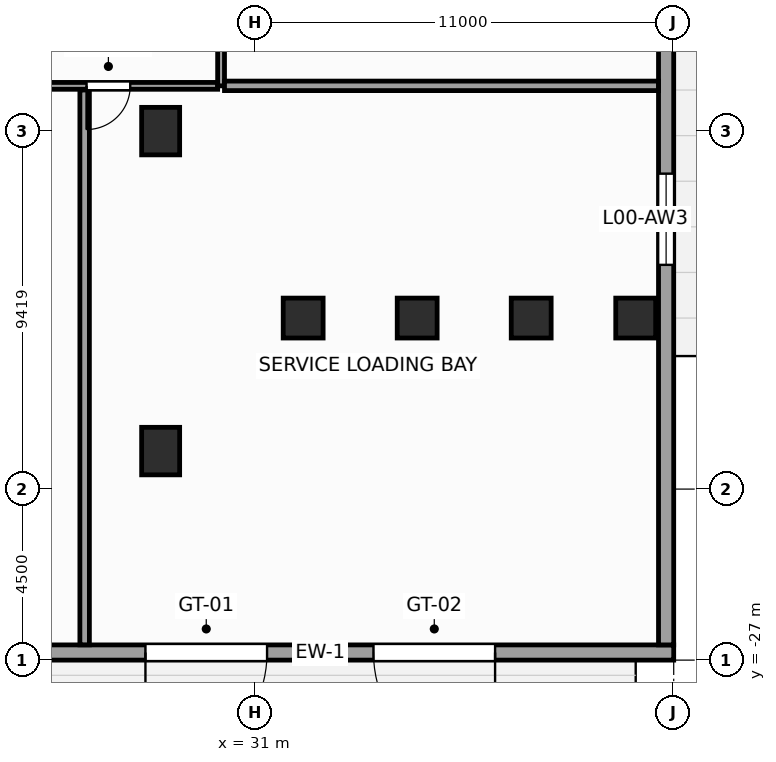
"""IFC4 building model, lengths in metres.
Left out: names, types, materials, properties, quantities, classifications, styles, units other than length and angle.
Written with IfcOpenShell. Run it as: python <this file> out.ifc"""

import sys

from ifc_helpers import new_model, si_unit, direction, frame, frame_2d, origin, origin_2d, place, context, subcontext, project, spatial, rectangle, extrude, source, transform, mapped, element, fill, save


model = new_model("IFC4")
c1 = context("Model", 3, precision=1e-05, world=origin(), true_north=direction((0.0, 1.0)))
c2 = subcontext(c1, "Body", "Model", "MODEL_VIEW")
j1 = project(units=[si_unit("LENGTHUNIT", "METRE"), si_unit("PLANEANGLEUNIT", "RADIAN")], contexts=[c1])
p1 = place(None, origin())
s1 = spatial("IfcSite", under=j1, at=p1, CompositionType="ELEMENT")
p2 = place(p1, origin())
s2 = spatial("IfcBuilding", under=s1, at=p2, CompositionType="ELEMENT")
p3 = place(p2, origin())
s3 = spatial("IfcBuildingStorey", under=s2, at=p3, CompositionType="ELEMENT", Elevation=0.0)
m1 = source(origin(), c2, "Body", "SweptSolid", [
    extrude(rectangle(XDim=1.0, YDim=1.25, at=origin_2d()), origin(), (0.0, 0.0, 1.0), 6.0),
])
for number, where, z_axis, x_axis in (
    (1, (28.5, -21.5, 0.0), (0.0, 0.0, 1.0), (1.0, 0.0, 0.0)),
    (2, (28.5, -13.081, 0.0), (0.0, 0.0, 1.0), (1.0, 0.0, 0.0)),
):
    element("IfcColumn", number, at=place(p3, frame(where, z_axis=z_axis, x_axis=x_axis)), inside=s3, PredefinedType="COLUMN", context=c2, shape_type="MappedRepresentation", body=[
        mapped(m1, transform((0.0, 0.0, 0.0), scale=1.0)),
    ])
m2 = source(origin(), c2, "Body", "SweptSolid", [
    extrude(rectangle(XDim=1.05, YDim=1.05, at=origin_2d()), origin(), (0.0, 0.0, 1.0), 6.0),
])
for number, where, z_axis, x_axis in (
    (3, (32.25, -18.0, 0.0), (0.0, 0.0, 1.0), (1.0, 0.0, 0.0)),
    (4, (35.25, -18.0, 0.0), (0.0, 0.0, 1.0), (1.0, 0.0, 0.0)),
    (5, (38.25, -18.0, 0.0), (0.0, 0.0, 1.0), (1.0, 0.0, 0.0)),
    (6, (41.0, -18.0, 0.0), (0.0, 0.0, 1.0), (1.0, 0.0, 0.0)),
):
    element("IfcColumn", number, at=place(p3, frame(where, z_axis=z_axis, x_axis=x_axis)), inside=s3, PredefinedType="COLUMN", context=c2, shape_type="MappedRepresentation", body=[
        mapped(m2, transform((0.0, 0.0, 0.0), scale=1.0)),
    ])
p4 = place(p3, frame((24.6, -26.8, 0.0), z_axis=(0.0, 0.0, 1.0), x_axis=(1.0, 0.0, 0.0)))
e7 = element("IfcWall", 7, at=p4, inside=s3, PredefinedType="STANDARD", context=c2, shape_type="SweptSolid", body=[
    extrude(rectangle(XDim=17.4, YDim=0.4, at=frame_2d((8.7, 0.0))), origin(), (0.0, 0.0, 1.0), 5.66),
])
p5 = place(p4, frame((3.5, 0.0, 0.0)))
e8 = element("IfcOpeningElement", 8, at=p5, cuts=e7, PredefinedType="OPENING", context=c2, shape_type="SweptSolid", body=[
    extrude(rectangle(XDim=3.2, YDim=3.6, at=frame_2d((1.6, 1.8))), frame((0.0, 0.21, 0.0), z_axis=(0.0, -1.0, 0.0), x_axis=(1.0, 0.0, 0.0)), (0.0, 0.0, 1.0), 0.42),
])
p6 = place(p4, frame((9.5, 0.0, 0.0)))
e9 = element("IfcOpeningElement", 9, at=p6, cuts=e7, PredefinedType="OPENING", context=c2, shape_type="SweptSolid", body=[
    extrude(rectangle(XDim=3.2, YDim=3.6, at=frame_2d((1.6, 1.8))), frame((0.0, 0.21, 0.0), z_axis=(0.0, -1.0, 0.0), x_axis=(1.0, 0.0, 0.0)), (0.0, 0.0, 1.0), 0.42),
])
p7 = place(p3, frame((41.8, -26.6, 0.0), z_axis=(0.0, 0.0, 1.0), x_axis=(0.0, 1.0, 0.0)))
e10 = element("IfcWall", 10, at=p7, inside=s3, PredefinedType="STANDARD", context=c2, shape_type="SweptSolid", body=[
    extrude(rectangle(XDim=53.2, YDim=0.4, at=frame_2d((26.6, 0.0))), origin(), (0.0, 0.0, 1.0), 5.66),
])
p8 = place(p7, frame((10.0, 0.0, 0.9)))
e11 = element("IfcOpeningElement", 11, at=p8, cuts=e10, PredefinedType="OPENING", context=c2, shape_type="SweptSolid", body=[
    extrude(rectangle(XDim=2.4, YDim=3.2, at=frame_2d((1.2, 1.6))), frame((0.0, 0.21, 0.0), z_axis=(0.0, -1.0, 0.0), x_axis=(1.0, 0.0, 0.0)), (0.0, 0.0, 1.0), 0.42),
])
p9 = place(p7, frame((36.0, 0.0, 0.9)))
e12 = element("IfcOpeningElement", 12, at=p9, cuts=e10, PredefinedType="OPENING", context=c2, shape_type="SweptSolid", body=[
    extrude(rectangle(XDim=2.4, YDim=3.2, at=frame_2d((1.2, 1.6))), frame((0.0, 0.21, 0.0), z_axis=(0.0, -1.0, 0.0), x_axis=(1.0, 0.0, 0.0)), (0.0, 0.0, 1.0), 0.42),
])
p10 = place(p7, frame((23.0, 0.0, 0.0)))
e13 = element("IfcOpeningElement", 13, at=p10, cuts=e10, PredefinedType="OPENING", context=c2, shape_type="SweptSolid", body=[
    extrude(rectangle(XDim=3.2, YDim=3.6, at=frame_2d((1.6, 1.8))), frame((0.0, 0.21, 0.0), z_axis=(0.0, -1.0, 0.0), x_axis=(1.0, 0.0, 0.0)), (0.0, 0.0, 1.0), 0.42),
])
p11 = place(p3, frame((-30.0, -11.89, 0.0), z_axis=(0.0, 0.0, 1.0), x_axis=(1.0, 0.0, 0.0)))
e14 = element("IfcWall", 14, at=p11, inside=s3, PredefinedType="PARTITIONING", context=c2, shape_type="SweptSolid", body=[
    extrude(rectangle(XDim=60.0, YDim=0.18, at=frame_2d((30.0, 0.0))), origin(), (0.0, 0.0, 1.0), 5.66),
])
p12 = place(p11, frame((2.25, 0.0, 0.0)))
e15 = element("IfcOpeningElement", 15, at=p12, cuts=e14, PredefinedType="OPENING", context=c2, shape_type="SweptSolid", body=[
    extrude(rectangle(XDim=1.15, YDim=2.25, at=frame_2d((0.575, 1.125))), frame((0.0, 0.1, 0.0), z_axis=(0.0, -1.0, 0.0), x_axis=(1.0, 0.0, 0.0)), (0.0, 0.0, 1.0), 0.2),
])
p13 = place(p11, frame((7.5, 0.0, 0.0)))
e16 = element("IfcOpeningElement", 16, at=p13, cuts=e14, PredefinedType="OPENING", context=c2, shape_type="SweptSolid", body=[
    extrude(rectangle(XDim=1.15, YDim=2.25, at=frame_2d((0.575, 1.125))), frame((0.0, 0.1, 0.0), z_axis=(0.0, -1.0, 0.0), x_axis=(1.0, 0.0, 0.0)), (0.0, 0.0, 1.0), 0.2),
])
p14 = place(p11, frame((12.6, 0.0, 0.0)))
e17 = element("IfcOpeningElement", 17, at=p14, cuts=e14, PredefinedType="OPENING", context=c2, shape_type="SweptSolid", body=[
    extrude(rectangle(XDim=0.95, YDim=2.1, at=frame_2d((0.475, 1.05))), frame((0.0, 0.1, 0.0), z_axis=(0.0, -1.0, 0.0), x_axis=(1.0, 0.0, 0.0)), (0.0, 0.0, 1.0), 0.2),
])
p15 = place(p11, frame((14.85, 0.0, 0.0)))
e18 = element("IfcOpeningElement", 18, at=p15, cuts=e14, PredefinedType="OPENING", context=c2, shape_type="SweptSolid", body=[
    extrude(rectangle(XDim=0.95, YDim=2.1, at=frame_2d((0.475, 1.05))), frame((0.0, 0.1, 0.0), z_axis=(0.0, -1.0, 0.0), x_axis=(1.0, 0.0, 0.0)), (0.0, 0.0, 1.0), 0.2),
])
p16 = place(p11, frame((28.5, 0.0, 0.0)))
e19 = element("IfcOpeningElement", 19, at=p16, cuts=e14, PredefinedType="OPENING", context=c2, shape_type="SweptSolid", body=[
    extrude(rectangle(XDim=1.6, YDim=2.5, at=frame_2d((0.8, 1.25))), frame((0.0, 0.1, 0.0), z_axis=(0.0, -1.0, 0.0), x_axis=(1.0, 0.0, 0.0)), (0.0, 0.0, 1.0), 0.2),
])
p17 = place(p11, frame((49.5, 0.0, 0.0)))
e20 = element("IfcOpeningElement", 20, at=p17, cuts=e14, PredefinedType="OPENING", context=c2, shape_type="SweptSolid", body=[
    extrude(rectangle(XDim=1.1, YDim=2.2, at=frame_2d((0.55, 1.1))), frame((0.0, 0.1, 0.0), z_axis=(0.0, -1.0, 0.0), x_axis=(1.0, 0.0, 0.0)), (0.0, 0.0, 1.0), 0.2),
])
p18 = place(p11, frame((56.55, 0.0, 0.0)))
e21 = element("IfcOpeningElement", 21, at=p18, cuts=e14, PredefinedType="OPENING", context=c2, shape_type="SweptSolid", body=[
    extrude(rectangle(XDim=1.15, YDim=2.25, at=frame_2d((0.575, 1.125))), frame((0.0, 0.1, 0.0), z_axis=(0.0, -1.0, 0.0), x_axis=(1.0, 0.0, 0.0)), (0.0, 0.0, 1.0), 0.2),
])
p19 = place(p3, frame((30.09, -11.89, 0.0), z_axis=(0.0, 0.0, 1.0), x_axis=(0.0, 1.0, 0.0)))
e22 = element("IfcWall", 22, at=p19, inside=s3, PredefinedType="PARTITIONING", context=c2, shape_type="SweptSolid", body=[
    extrude(rectangle(XDim=3.38, YDim=0.18, at=frame_2d((1.69, 0.0))), origin(), (0.0, 0.0, 1.0), 5.66),
])
p20 = place(p3, frame((30.18, -11.89, 0.0), z_axis=(0.0, 0.0, 1.0), x_axis=(1.0, 0.0, 0.0)))
e23 = element("IfcWall", 23, at=p20, inside=s3, PredefinedType="PARTITIONING", context=c2, shape_type="SweptSolid", body=[
    extrude(rectangle(XDim=11.418, YDim=0.25, at=frame_2d((5.709, 0.0))), origin(), (0.0, 0.0, 1.0), 5.66),
])
p21 = place(p3, frame((26.5, -26.598, 0.0), z_axis=(0.0, 0.0, 1.0), x_axis=(0.0, 1.0, 0.0)))
e24 = element("IfcWall", 24, at=p21, inside=s3, PredefinedType="PARTITIONING", context=c2, shape_type="SweptSolid", body=[
    extrude(rectangle(XDim=14.598, YDim=0.25, at=frame_2d((7.299, 0.0))), origin(), (0.0, 0.0, 1.0), 5.66),
])
m3 = source(origin(), c2, "Body", "SweptSolid", [
    extrude(rectangle(XDim=2.4, YDim=3.2, at=frame_2d((1.2, 1.6))), frame((0.0, 0.03, 0.0), z_axis=(0.0, -1.0, 0.0), x_axis=(1.0, 0.0, 0.0)), (0.0, 0.0, 1.0), 0.06),
])
p22 = place(p8, origin())
e25 = element("IfcWindow", 25, at=p22, inside=s3, PartitioningType="SINGLE_PANEL", PredefinedType="WINDOW", context=c2, shape_type="MappedRepresentation", body=[
    mapped(m3, transform((0.0, 0.0, 0.0), scale=1.0)),
])
fill(e11, e25)
m4 = source(origin(), c2, "Body", "SweptSolid", [
    extrude(rectangle(XDim=3.2, YDim=3.6, at=frame_2d((1.6, 1.8))), frame((0.0, 0.025, 0.0), z_axis=(0.0, -1.0, 0.0), x_axis=(1.0, 0.0, 0.0)), (0.0, 0.0, 1.0), 0.05),
])
p23 = place(p5, frame((3.2, 0.0, 0.0), z_axis=(0.0, 0.0, 1.0), x_axis=(-1.0, 0.0, 0.0)))
e26 = element("IfcDoor", 26, at=p23, inside=s3, OperationType="SINGLE_SWING_LEFT", PredefinedType="GATE", context=c2, shape_type="MappedRepresentation", body=[
    mapped(m4, transform((0.0, 0.0, 0.0), scale=1.0)),
])
fill(e8, e26)
p24 = place(p6, frame((3.2, 0.0, 0.0), z_axis=(0.0, 0.0, 1.0), x_axis=(-1.0, 0.0, 0.0)))
e27 = element("IfcDoor", 27, at=p24, inside=s3, OperationType="SINGLE_SWING_RIGHT", PredefinedType="GATE", context=c2, shape_type="MappedRepresentation", body=[
    mapped(m4, transform((0.0, 0.0, 0.0), scale=1.0)),
])
fill(e9, e27)
m5 = source(origin(), c2, "Body", "SweptSolid", [
    extrude(rectangle(XDim=1.15, YDim=2.25, at=frame_2d((0.575, 1.125))), frame((0.0, 0.025, 0.0), z_axis=(0.0, -1.0, 0.0), x_axis=(1.0, 0.0, 0.0)), (0.0, 0.0, 1.0), 0.05),
])
p25 = place(p18, frame((1.15, 0.0, 0.0), z_axis=(0.0, 0.0, 1.0), x_axis=(-1.0, 0.0, 0.0)))
e28 = element("IfcDoor", 28, at=p25, inside=s3, OperationType="SINGLE_SWING_LEFT", PredefinedType="DOOR", context=c2, shape_type="MappedRepresentation", body=[
    mapped(m5, transform((0.0, 0.0, 0.0), scale=1.0)),
])
fill(e21, e28)
save(model, sys.argv[1])
